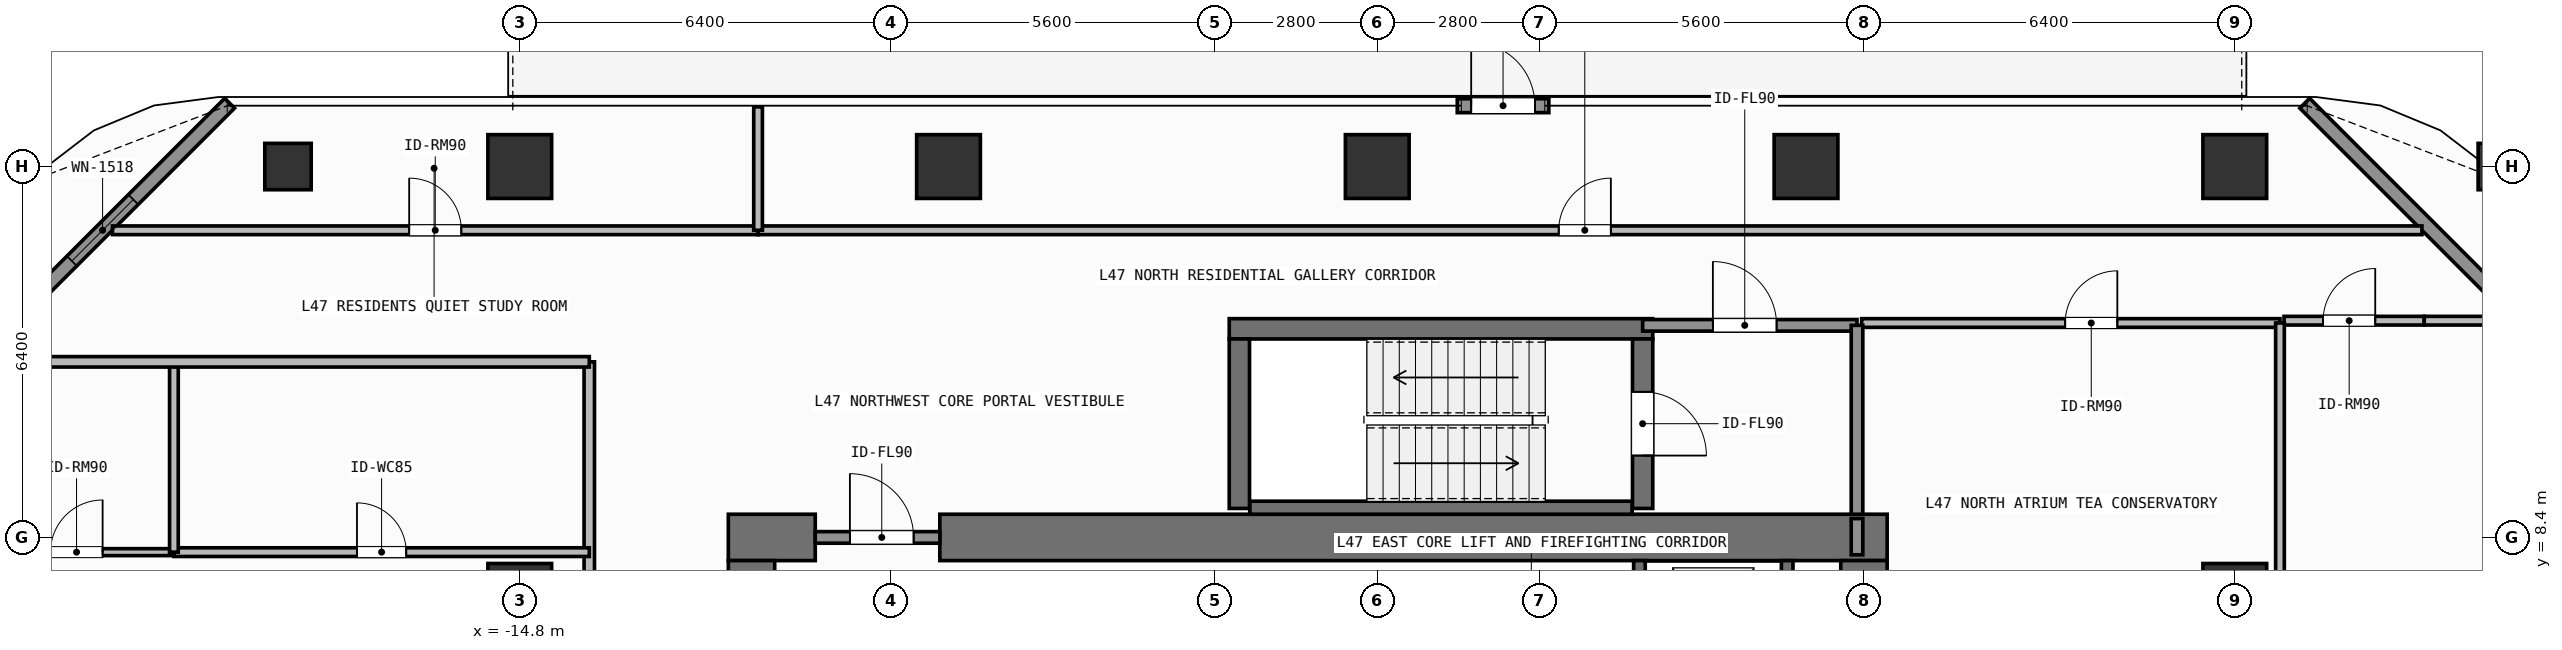
"""IFC4 building model, lengths in metres.
Left out: names, types, materials, properties, quantities, classifications, styles, units other than length and angle.
Written with IfcOpenShell. Run it as: python <this file> out.ifc"""

import sys

from ifc_helpers import new_model, si_unit, direction, frame, frame_2d, origin, origin_2d, place, context, subcontext, project, spatial, rectangle, hollow_rectangle, extrude, element, fill, save


model = new_model("IFC4")
c1 = context("Model", 3, precision=1e-05, world=origin(), true_north=direction((0.0, 1.0)))
c2 = subcontext(c1, "Body", "Model", "MODEL_VIEW")
j1 = project(units=[si_unit("LENGTHUNIT", "METRE"), si_unit("PLANEANGLEUNIT", "RADIAN")], contexts=[c1])
p1 = place(None, origin())
s1 = spatial("IfcSite", under=j1, at=p1, CompositionType="ELEMENT")
p2 = place(p1, origin())
s2 = spatial("IfcBuilding", under=s1, at=p2, CompositionType="ELEMENT")
p3 = place(p2, frame((0.0, 0.0, 191.4)))
s3 = spatial("IfcBuildingStorey", under=s2, at=p3, CompositionType="ELEMENT", Elevation=191.4)
p4 = place(p3, frame((-11.2, 8.4, 0.0), z_axis=(0.0, 0.0, 1.0), x_axis=(1.0, 0.0, 0.0)))
e1 = element("IfcWall", 1, at=p4, inside=s3, PredefinedType="SHEAR", context=c2, shape_type="SweptSolid", body=[
    extrude(rectangle(XDim=1.5, YDim=0.8, at=frame_2d((0.75, 0.0))), origin(), (0.0, 0.0, 1.0), 3.9),
])
p5 = place(p3, frame((-7.55, 8.4, 0.0), z_axis=(0.0, 0.0, 1.0), x_axis=(1.0, 0.0, 0.0)))
e2 = element("IfcWall", 2, at=p5, inside=s3, PredefinedType="SHEAR", context=c2, shape_type="SweptSolid", body=[
    extrude(rectangle(XDim=16.35, YDim=0.8, at=frame_2d((8.175, 0.0))), origin(), (0.0, 0.0, 1.0), 3.9),
])
p6 = place(p3, frame((-10.8, -8.0, 0.0), z_axis=(0.0, 0.0, 1.0), x_axis=(0.0, 1.0, 0.0)))
e3 = element("IfcWall", 3, at=p6, inside=s3, PredefinedType="SHEAR", context=c2, shape_type="SweptSolid", body=[
    extrude(rectangle(XDim=16.0, YDim=0.8, at=frame_2d((8.0, 0.0))), origin(), (0.0, 0.0, 1.0), 3.9),
])
p7 = place(p3, frame((8.4, 5.825, 0.0), z_axis=(0.0, 0.0, 1.0), x_axis=(0.0, 1.0, 0.0)))
e4 = element("IfcWall", 4, at=p7, inside=s3, PredefinedType="SHEAR", context=c2, shape_type="SweptSolid", body=[
    extrude(rectangle(XDim=2.175, YDim=0.8, at=frame_2d((1.087, 0.0))), origin(), (0.0, 0.0, 1.0), 3.9),
])
p8 = place(p3, frame((-2.555, 12.0, 0.0), z_axis=(0.0, 0.0, 1.0), x_axis=(1.0, 0.0, 0.0)))
e5 = element("IfcWall", 5, at=p8, inside=s3, PredefinedType="SHEAR", context=c2, shape_type="SweptSolid", body=[
    extrude(rectangle(XDim=7.31, YDim=0.35, at=frame_2d((3.655, 0.0))), origin(), (0.0, 0.0, 1.0), 3.9),
])
p9 = place(p3, frame((-2.2, 8.913, 0.0), z_axis=(0.0, 0.0, 1.0), x_axis=(1.0, 0.0, 0.0)))
e6 = element("IfcWall", 6, at=p9, inside=s3, PredefinedType="SHEAR", context=c2, shape_type="SweptSolid", body=[
    extrude(rectangle(XDim=6.6, YDim=0.225, at=frame_2d((3.3, 0.0))), origin(), (0.0, 0.0, 1.0), 3.9),
])
p10 = place(p3, frame((-2.38, 8.9, 0.0), z_axis=(0.0, 0.0, 1.0), x_axis=(0.0, 1.0, 0.0)))
e7 = element("IfcWall", 7, at=p10, inside=s3, PredefinedType="SHEAR", context=c2, shape_type="SweptSolid", body=[
    extrude(rectangle(XDim=2.925, YDim=0.35, at=frame_2d((1.462, 0.0))), origin(), (0.0, 0.0, 1.0), 3.9),
])
p11 = place(p3, frame((4.58, 11.825, 0.0), z_axis=(0.0, 0.0, 1.0), x_axis=(0.0, -1.0, 0.0)))
e8 = element("IfcWall", 8, at=p11, inside=s3, PredefinedType="SHEAR", context=c2, shape_type="SweptSolid", body=[
    extrude(rectangle(XDim=2.925, YDim=0.35, at=frame_2d((1.462, 0.0))), origin(), (0.0, 0.0, 1.0), 3.9),
])
p12 = place(p11, frame((0.913, 0.0, 0.0)))
e9 = element("IfcOpeningElement", 9, at=p12, cuts=e8, PredefinedType="OPENING", context=c2, shape_type="SweptSolid", body=[
    extrude(rectangle(XDim=1.1, YDim=2.15, at=frame_2d((0.55, 1.075))), frame((0.0, 0.185, 0.0), z_axis=(0.0, -1.0, 0.0), x_axis=(1.0, 0.0, 0.0)), (0.0, 0.0, 1.0), 0.37),
])
for number, where, z_axis, x_axis in (
    (10, (-14.8, 14.8, 0.0), (0.0, 0.0, 1.0), (1.0, 0.0, 0.0)),
    (11, (-7.4, 14.8, 0.0), (0.0, 0.0, 1.0), (1.0, 0.0, 0.0)),
    (12, (0.0, 14.8, 0.0), (0.0, 0.0, 1.0), (1.0, 0.0, 0.0)),
    (13, (7.4, 14.8, 0.0), (0.0, 0.0, 1.0), (1.0, 0.0, 0.0)),
    (14, (14.8, 14.8, 0.0), (0.0, 0.0, 1.0), (1.0, 0.0, 0.0)),
    (15, (-14.8, 7.4, 0.0), (0.0, 0.0, 1.0), (1.0, 0.0, 0.0)),
    (16, (14.8, 7.4, 0.0), (0.0, 0.0, 1.0), (1.0, 0.0, 0.0)),
):
    element("IfcColumn", number, at=place(p3, frame(where, z_axis=z_axis, x_axis=x_axis)), inside=s3, PredefinedType="COLUMN", context=c2, shape_type="SweptSolid", body=[
        extrude(rectangle(XDim=1.1, YDim=1.1, at=origin_2d()), origin(), (0.0, 0.0, 1.0), 3.9),
    ])
for number, where, z_axis, x_axis in (
    (17, (-18.8, 14.8, 0.0), (0.0, 0.0, 1.0), (1.0, 0.0, 0.0)),
    (18, (19.4, 14.8, 0.0), (0.0, 0.0, 1.0), (1.0, 0.0, 0.0)),
):
    element("IfcColumn", number, at=place(p3, frame(where, z_axis=z_axis, x_axis=x_axis)), inside=s3, PredefinedType="COLUMN", context=c2, shape_type="SweptSolid", body=[
        extrude(hollow_rectangle(XDim=0.8, YDim=0.8, WallThickness=0.036, at=origin_2d()), origin(), (0.0, 0.0, 1.0), 3.9),
    ])
p13 = place(p3, frame((1.381, 15.85, 0.0), z_axis=(0.0, 0.0, 1.0), x_axis=(1.0, 0.0, 0.0)))
e19 = element("IfcWall", 19, at=p13, inside=s3, PredefinedType="SOLIDWALL", context=c2, shape_type="SweptSolid", body=[
    extrude(rectangle(XDim=1.58, YDim=0.24, at=frame_2d((0.79, 0.0))), origin(), (0.0, 0.0, 1.0), 3.68),
])
p14 = place(p13, frame((0.24, 0.0, 0.0)))
e20 = element("IfcOpeningElement", 20, at=p14, cuts=e19, PredefinedType="OPENING", context=c2, shape_type="SweptSolid", body=[
    extrude(rectangle(XDim=1.1, YDim=2.2, at=frame_2d((0.55, 1.1))), frame((0.0, 0.13, 0.0), z_axis=(0.0, -1.0, 0.0), x_axis=(1.0, 0.0, 0.0)), (0.0, 0.0, 1.0), 0.26),
])
p15 = place(p3, frame((-24.192, 11.508, 0.0), z_axis=(0.0, 0.0, 1.0), x_axis=(0.707106781187, 0.707106781187, 0.0)))
e21 = element("IfcWall", 21, at=p15, inside=s3, PredefinedType="SOLIDWALL", context=c2, shape_type="SweptSolid", body=[
    extrude(rectangle(XDim=6.201, YDim=0.24, at=frame_2d((3.101, 0.0))), origin(), (0.0, 0.0, 1.0), 3.68),
])
p16 = place(p15, frame((2.351, 0.0, 0.8)))
e22 = element("IfcOpeningElement", 22, at=p16, cuts=e21, PredefinedType="OPENING", context=c2, shape_type="SweptSolid", body=[
    extrude(rectangle(XDim=1.5, YDim=1.85, at=frame_2d((0.75, 0.925))), frame((0.0, 0.13, 0.0), z_axis=(0.0, -1.0, 0.0), x_axis=(1.0, 0.0, 0.0)), (0.0, 0.0, 1.0), 0.26),
])
p17 = place(p3, frame((16.008, 15.892, 0.0), z_axis=(0.0, 0.0, 1.0), x_axis=(0.707106781187, -0.707106781187, 0.0)))
e23 = element("IfcWall", 23, at=p17, inside=s3, PredefinedType="SOLIDWALL", context=c2, shape_type="SweptSolid", body=[
    extrude(rectangle(XDim=6.201, YDim=0.24, at=frame_2d((3.101, 0.0))), origin(), (0.0, 0.0, 1.0), 3.68),
])
p18 = place(p3, frame((4.525, 5.825, 0.0), z_axis=(0.0, 0.0, 1.0), x_axis=(0.0, 1.0, 0.0)))
e24 = element("IfcWall", 24, at=p18, inside=s3, PredefinedType="SHEAR", context=c2, shape_type="SweptSolid", body=[
    extrude(rectangle(XDim=2.175, YDim=0.2, at=frame_2d((1.087, 0.0))), origin(), (0.0, 0.0, 1.0), 3.68),
])
p19 = place(p18, frame((0.425, 0.0, 0.0)))
e25 = element("IfcOpeningElement", 25, at=p19, cuts=e24, PredefinedType="OPENING", context=c2, shape_type="SweptSolid", body=[
    extrude(rectangle(XDim=1.1, YDim=2.2, at=frame_2d((0.55, 1.1))), frame((0.0, 0.11, 0.0), z_axis=(0.0, -1.0, 0.0), x_axis=(1.0, 0.0, 0.0)), (0.0, 0.0, 1.0), 0.22),
])
p20 = place(p3, frame((7.075, 5.825, 0.0), z_axis=(0.0, 0.0, 1.0), x_axis=(0.0, 1.0, 0.0)))
e26 = element("IfcWall", 26, at=p20, inside=s3, PredefinedType="SHEAR", context=c2, shape_type="SweptSolid", body=[
    extrude(rectangle(XDim=2.175, YDim=0.2, at=frame_2d((1.087, 0.0))), origin(), (0.0, 0.0, 1.0), 3.68),
])
p21 = place(p3, frame((4.58, 12.06, 0.0), z_axis=(0.0, 0.0, 1.0), x_axis=(1.0, 0.0, 0.0)))
e27 = element("IfcWall", 27, at=p21, inside=s3, PredefinedType="SOLIDWALL", context=c2, shape_type="SweptSolid", body=[
    extrude(rectangle(XDim=3.7, YDim=0.2, at=frame_2d((1.85, 0.0))), origin(), (0.0, 0.0, 1.0), 3.68),
])
p22 = place(p21, frame((1.212, 0.0, 0.0)))
e28 = element("IfcOpeningElement", 28, at=p22, cuts=e27, PredefinedType="OPENING", context=c2, shape_type="SweptSolid", body=[
    extrude(rectangle(XDim=1.1, YDim=2.15, at=frame_2d((0.55, 1.075))), frame((0.0, 0.11, 0.0), z_axis=(0.0, -1.0, 0.0), x_axis=(1.0, 0.0, 0.0)), (0.0, 0.0, 1.0), 0.22),
])
p23 = place(p3, frame((-9.7, 8.4, 0.0), z_axis=(0.0, 0.0, 1.0), x_axis=(1.0, 0.0, 0.0)))
e29 = element("IfcWall", 29, at=p23, inside=s3, PredefinedType="SOLIDWALL", context=c2, shape_type="SweptSolid", body=[
    extrude(rectangle(XDim=2.15, YDim=0.2, at=frame_2d((1.075, 0.0))), origin(), (0.0, 0.0, 1.0), 2.82),
])
p24 = place(p23, frame((0.598, 0.0, 0.0)))
e30 = element("IfcOpeningElement", 30, at=p24, cuts=e29, PredefinedType="OPENING", context=c2, shape_type="SweptSolid", body=[
    extrude(rectangle(XDim=1.1, YDim=2.15, at=frame_2d((0.55, 1.075))), frame((0.0, 0.11, 0.0), z_axis=(0.0, -1.0, 0.0), x_axis=(1.0, 0.0, 0.0)), (0.0, 0.0, 1.0), 0.22),
])
p25 = place(p3, frame((8.36, 12.1, 0.0), z_axis=(0.0, 0.0, 1.0), x_axis=(1.0, 0.0, 0.0)))
e31 = element("IfcWall", 31, at=p25, inside=s3, PredefinedType="PARTITIONING", context=c2, shape_type="SweptSolid", body=[
    extrude(rectangle(XDim=7.22, YDim=0.15, at=frame_2d((3.61, 0.0))), origin(), (0.0, 0.0, 1.0), 3.68),
])
p26 = place(p25, frame((3.513, 0.0, 0.0)))
e32 = element("IfcOpeningElement", 32, at=p26, cuts=e31, PredefinedType="OPENING", context=c2, shape_type="SweptSolid", body=[
    extrude(rectangle(XDim=0.9, YDim=2.1, at=frame_2d((0.45, 1.05))), frame((0.0, 0.085, 0.0), z_axis=(0.0, -1.0, 0.0), x_axis=(1.0, 0.0, 0.0)), (0.0, 0.0, 1.0), 0.17),
])
p27 = place(p3, frame((-21.83, 13.7, 0.0), z_axis=(0.0, 0.0, 1.0), x_axis=(1.0, 0.0, 0.0)))
e33 = element("IfcWall", 33, at=p27, inside=s3, PredefinedType="PARTITIONING", context=c2, shape_type="SweptSolid", body=[
    extrude(rectangle(XDim=11.143, YDim=0.15, at=frame_2d((5.572, 0.0))), origin(), (0.0, 0.0, 1.0), 3.68),
])
p28 = place(p27, frame((5.122, 0.0, 0.0)))
e34 = element("IfcOpeningElement", 34, at=p28, cuts=e33, PredefinedType="OPENING", context=c2, shape_type="SweptSolid", body=[
    extrude(rectangle(XDim=0.9, YDim=2.1, at=frame_2d((0.45, 1.05))), frame((0.0, 0.085, 0.0), z_axis=(0.0, -1.0, 0.0), x_axis=(1.0, 0.0, 0.0)), (0.0, 0.0, 1.0), 0.17),
])
p29 = place(p3, frame((-10.687, 13.7, 0.0), z_axis=(0.0, 0.0, 1.0), x_axis=(1.0, 0.0, 0.0)))
e35 = element("IfcWall", 35, at=p29, inside=s3, PredefinedType="PARTITIONING", context=c2, shape_type="SweptSolid", body=[
    extrude(rectangle(XDim=28.717, YDim=0.15, at=frame_2d((14.358, 0.0))), origin(), (0.0, 0.0, 1.0), 3.68),
])
p30 = place(p29, frame((13.819, 0.0, 0.0)))
e36 = element("IfcOpeningElement", 36, at=p30, cuts=e35, PredefinedType="OPENING", context=c2, shape_type="SweptSolid", body=[
    extrude(rectangle(XDim=0.9, YDim=2.1, at=frame_2d((0.45, 1.05))), frame((0.0, 0.085, 0.0), z_axis=(0.0, -1.0, 0.0), x_axis=(1.0, 0.0, 0.0)), (0.0, 0.0, 1.0), 0.17),
])
p31 = place(p3, frame((-13.6, 0.644, 0.0), z_axis=(0.0, 0.0, 1.0), x_axis=(0.0, 1.0, 0.0)))
e37 = element("IfcWall", 37, at=p31, inside=s3, PredefinedType="PARTITIONING", context=c2, shape_type="SweptSolid", body=[
    extrude(rectangle(XDim=10.786, YDim=0.18, at=frame_2d((5.393, 0.0))), origin(), (0.0, 0.0, 1.0), 3.68),
])
p32 = place(p31, frame((4.982, 0.0, 0.0)))
e38 = element("IfcOpeningElement", 38, at=p32, cuts=e37, PredefinedType="OPENING", context=c2, shape_type="SweptSolid", body=[
    extrude(rectangle(XDim=1.0, YDim=2.2, at=frame_2d((0.5, 1.1))), frame((0.0, 0.1, 0.0), z_axis=(0.0, -1.0, 0.0), x_axis=(1.0, 0.0, 0.0)), (0.0, 0.0, 1.0), 0.2),
])
p33 = place(p3, frame((-20.769, 8.146, 0.0), z_axis=(0.0, 0.0, 1.0), x_axis=(1.0, 0.0, 0.0)))
e39 = element("IfcWall", 39, at=p33, inside=s3, PredefinedType="PARTITIONING", context=c2, shape_type="SweptSolid", body=[
    extrude(rectangle(XDim=7.169, YDim=0.15, at=frame_2d((3.584, 0.0))), origin(), (0.0, 0.0, 1.0), 3.68),
])
p34 = place(p33, frame((3.159, 0.0, 0.0)))
e40 = element("IfcOpeningElement", 40, at=p34, cuts=e39, PredefinedType="OPENING", context=c2, shape_type="SweptSolid", body=[
    extrude(rectangle(XDim=0.85, YDim=2.1, at=frame_2d((0.425, 1.05))), frame((0.0, 0.085, 0.0), z_axis=(0.0, -1.0, 0.0), x_axis=(1.0, 0.0, 0.0)), (0.0, 0.0, 1.0), 0.17),
])
p35 = place(p3, frame((-24.13, 8.146, 0.0), z_axis=(0.0, 0.0, 1.0), x_axis=(1.0, 0.0, 0.0)))
e41 = element("IfcWall", 41, at=p35, inside=s3, PredefinedType="PARTITIONING", context=c2, shape_type="SweptSolid", body=[
    extrude(rectangle(XDim=3.361, YDim=0.12, at=frame_2d((1.68, 0.0))), origin(), (0.0, 0.0, 1.0), 3.68),
])
p36 = place(p35, frame((1.23, 0.0, 0.0)))
e42 = element("IfcOpeningElement", 42, at=p36, cuts=e41, PredefinedType="OPENING", context=c2, shape_type="SweptSolid", body=[
    extrude(rectangle(XDim=0.9, YDim=2.1, at=frame_2d((0.45, 1.05))), frame((0.0, 0.07, 0.0), z_axis=(0.0, -1.0, 0.0), x_axis=(1.0, 0.0, 0.0)), (0.0, 0.0, 1.0), 0.14),
])
p37 = place(p3, frame((15.65, 12.14, 0.0), z_axis=(0.0, 0.0, 1.0), x_axis=(1.0, 0.0, 0.0)))
e43 = element("IfcWall", 43, at=p37, inside=s3, PredefinedType="PARTITIONING", context=c2, shape_type="SweptSolid", body=[
    extrude(rectangle(XDim=2.42, YDim=0.15, at=frame_2d((1.21, 0.0))), origin(), (0.0, 0.0, 1.0), 3.68),
])
p38 = place(p37, frame((0.674, 0.0, 0.0)))
e44 = element("IfcOpeningElement", 44, at=p38, cuts=e43, PredefinedType="OPENING", context=c2, shape_type="SweptSolid", body=[
    extrude(rectangle(XDim=0.9, YDim=2.1, at=frame_2d((0.45, 1.05))), frame((0.0, 0.085, 0.0), z_axis=(0.0, -1.0, 0.0), x_axis=(1.0, 0.0, 0.0)), (0.0, 0.0, 1.0), 0.17),
])
p39 = place(p3, frame((8.28, 8.8, 0.0), z_axis=(0.0, 0.0, 1.0), x_axis=(0.0, 1.0, 0.0)))
e45 = element("IfcWall", 45, at=p39, inside=s3, PredefinedType="SOLIDWALL", context=c2, shape_type="SweptSolid", body=[
    extrude(rectangle(XDim=3.26, YDim=0.2, at=frame_2d((1.63, 0.0))), origin(), (0.0, 0.0, 1.0), 3.68),
])
p40 = place(p3, frame((8.28, 8.1, 0.0), z_axis=(0.0, 0.0, 1.0), x_axis=(0.0, 1.0, 0.0)))
e46 = element("IfcWall", 46, at=p40, inside=s3, PredefinedType="SOLIDWALL", context=c2, shape_type="SweptSolid", body=[
    extrude(rectangle(XDim=0.625, YDim=0.2, at=frame_2d((0.312, 0.0))), origin(), (0.0, 0.0, 1.0), 3.68),
])
p41 = place(p3, frame((15.58, 5.85, 0.0), z_axis=(0.0, 0.0, 1.0), x_axis=(0.0, 1.0, 0.0)))
e47 = element("IfcWall", 47, at=p41, inside=s3, PredefinedType="PARTITIONING", context=c2, shape_type="SweptSolid", body=[
    extrude(rectangle(XDim=6.25, YDim=0.15, at=frame_2d((3.125, 0.0))), origin(), (0.0, 0.0, 1.0), 3.68),
])
p42 = place(p3, frame((-10.687, 13.7, 0.0), z_axis=(0.0, 0.0, 1.0), x_axis=(0.0, 1.0, 0.0)))
e48 = element("IfcWall", 48, at=p42, inside=s3, PredefinedType="PARTITIONING", context=c2, shape_type="SweptSolid", body=[
    extrude(rectangle(XDim=2.13, YDim=0.15, at=frame_2d((1.065, 0.0))), origin(), (0.0, 0.0, 1.0), 3.68),
])
p43 = place(p3, frame((-20.769, 8.146, 0.0), z_axis=(0.0, 0.0, 1.0), x_axis=(0.0, 1.0, 0.0)))
e49 = element("IfcWall", 49, at=p43, inside=s3, PredefinedType="PARTITIONING", context=c2, shape_type="SweptSolid", body=[
    extrude(rectangle(XDim=3.284, YDim=0.15, at=frame_2d((1.642, 0.0))), origin(), (0.0, 0.0, 1.0), 3.68),
])
p44 = place(p3, frame((-24.13, 11.43, 0.0), z_axis=(0.0, 0.0, 1.0), x_axis=(1.0, 0.0, 0.0)))
e50 = element("IfcWall", 50, at=p44, inside=s3, PredefinedType="PARTITIONING", context=c2, shape_type="SweptSolid", body=[
    extrude(rectangle(XDim=10.53, YDim=0.18, at=frame_2d((5.265, 0.0))), origin(), (0.0, 0.0, 1.0), 3.42),
])
p45 = place(p3, frame((18.07, 12.14, 0.0), z_axis=(0.0, 0.0, 1.0), x_axis=(1.0, 0.0, 0.0)))
e51 = element("IfcWall", 51, at=p45, inside=s3, PredefinedType="PARTITIONING", context=c2, shape_type="SweptSolid", body=[
    extrude(rectangle(XDim=1.52, YDim=0.15, at=frame_2d((0.76, 0.0))), origin(), (0.0, 0.0, 1.0), 3.68),
])
p46 = place(p14, origin())
e52 = element("IfcDoor", 52, at=p46, inside=s3, OperationType="SINGLE_SWING_LEFT", PredefinedType="DOOR", context=c2, shape_type="SweptSolid", body=[
    extrude(rectangle(XDim=1.1, YDim=2.2, at=frame_2d((0.55, 1.1))), frame((0.0, 0.025, 0.0), z_axis=(0.0, -1.0, 0.0), x_axis=(1.0, 0.0, 0.0)), (0.0, 0.0, 1.0), 0.05),
])
fill(e20, e52)
p47 = place(p16, origin())
e53 = element("IfcWindow", 53, at=p47, inside=s3, PartitioningType="SINGLE_PANEL", PredefinedType="WINDOW", context=c2, shape_type="SweptSolid", body=[
    extrude(rectangle(XDim=1.5, YDim=1.85, at=frame_2d((0.75, 0.925))), frame((0.0, 0.03, 0.0), z_axis=(0.0, -1.0, 0.0), x_axis=(1.0, 0.0, 0.0)), (0.0, 0.0, 1.0), 0.06),
])
fill(e22, e53)
p48 = place(p12, origin())
e54 = element("IfcDoor", 54, at=p48, inside=s3, OperationType="SINGLE_SWING_RIGHT", PredefinedType="DOOR", context=c2, shape_type="SweptSolid", body=[
    extrude(rectangle(XDim=1.1, YDim=2.15, at=frame_2d((0.55, 1.075))), frame((0.0, 0.025, 0.0), z_axis=(0.0, -1.0, 0.0), x_axis=(1.0, 0.0, 0.0)), (0.0, 0.0, 1.0), 0.05),
])
fill(e9, e54)
p49 = place(p22, origin())
e55 = element("IfcDoor", 55, at=p49, inside=s3, OperationType="SINGLE_SWING_LEFT", PredefinedType="DOOR", context=c2, shape_type="SweptSolid", body=[
    extrude(rectangle(XDim=1.1, YDim=2.15, at=frame_2d((0.55, 1.075))), frame((0.0, 0.025, 0.0), z_axis=(0.0, -1.0, 0.0), x_axis=(1.0, 0.0, 0.0)), (0.0, 0.0, 1.0), 0.05),
])
fill(e28, e55)
p50 = place(p24, origin())
e56 = element("IfcDoor", 56, at=p50, inside=s3, OperationType="SINGLE_SWING_LEFT", PredefinedType="DOOR", context=c2, shape_type="SweptSolid", body=[
    extrude(rectangle(XDim=1.1, YDim=2.15, at=frame_2d((0.55, 1.075))), frame((0.0, 0.025, 0.0), z_axis=(0.0, -1.0, 0.0), x_axis=(1.0, 0.0, 0.0)), (0.0, 0.0, 1.0), 0.05),
])
fill(e30, e56)
p51 = place(p26, origin())
e57 = element("IfcDoor", 57, at=p51, inside=s3, OperationType="SINGLE_SWING_RIGHT", PredefinedType="DOOR", context=c2, shape_type="SweptSolid", body=[
    extrude(rectangle(XDim=0.9, YDim=2.1, at=frame_2d((0.45, 1.05))), frame((0.0, 0.025, 0.0), z_axis=(0.0, -1.0, 0.0), x_axis=(1.0, 0.0, 0.0)), (0.0, 0.0, 1.0), 0.05),
])
fill(e32, e57)
p52 = place(p28, origin())
e58 = element("IfcDoor", 58, at=p52, inside=s3, OperationType="SINGLE_SWING_LEFT", PredefinedType="DOOR", context=c2, shape_type="SweptSolid", body=[
    extrude(rectangle(XDim=0.9, YDim=2.1, at=frame_2d((0.45, 1.05))), frame((0.0, 0.025, 0.0), z_axis=(0.0, -1.0, 0.0), x_axis=(1.0, 0.0, 0.0)), (0.0, 0.0, 1.0), 0.05),
])
fill(e34, e58)
p53 = place(p30, origin())
e59 = element("IfcDoor", 59, at=p53, inside=s3, OperationType="SINGLE_SWING_RIGHT", PredefinedType="DOOR", context=c2, shape_type="SweptSolid", body=[
    extrude(rectangle(XDim=0.9, YDim=2.1, at=frame_2d((0.45, 1.05))), frame((0.0, 0.025, 0.0), z_axis=(0.0, -1.0, 0.0), x_axis=(1.0, 0.0, 0.0)), (0.0, 0.0, 1.0), 0.05),
])
fill(e36, e59)
p54 = place(p34, origin())
e60 = element("IfcDoor", 60, at=p54, inside=s3, OperationType="SINGLE_SWING_LEFT", PredefinedType="DOOR", context=c2, shape_type="SweptSolid", body=[
    extrude(rectangle(XDim=0.85, YDim=2.1, at=frame_2d((0.425, 1.05))), frame((0.0, 0.025, 0.0), z_axis=(0.0, -1.0, 0.0), x_axis=(1.0, 0.0, 0.0)), (0.0, 0.0, 1.0), 0.05),
])
fill(e40, e60)
p55 = place(p36, origin())
e61 = element("IfcDoor", 61, at=p55, inside=s3, OperationType="SINGLE_SWING_RIGHT", PredefinedType="DOOR", context=c2, shape_type="SweptSolid", body=[
    extrude(rectangle(XDim=0.9, YDim=2.1, at=frame_2d((0.45, 1.05))), frame((0.0, 0.025, 0.0), z_axis=(0.0, -1.0, 0.0), x_axis=(1.0, 0.0, 0.0)), (0.0, 0.0, 1.0), 0.05),
])
fill(e42, e61)
p56 = place(p38, origin())
e62 = element("IfcDoor", 62, at=p56, inside=s3, OperationType="SINGLE_SWING_RIGHT", PredefinedType="DOOR", context=c2, shape_type="SweptSolid", body=[
    extrude(rectangle(XDim=0.9, YDim=2.1, at=frame_2d((0.45, 1.05))), frame((0.0, 0.025, 0.0), z_axis=(0.0, -1.0, 0.0), x_axis=(1.0, 0.0, 0.0)), (0.0, 0.0, 1.0), 0.05),
])
fill(e44, e62)
save(model, sys.argv[1])
